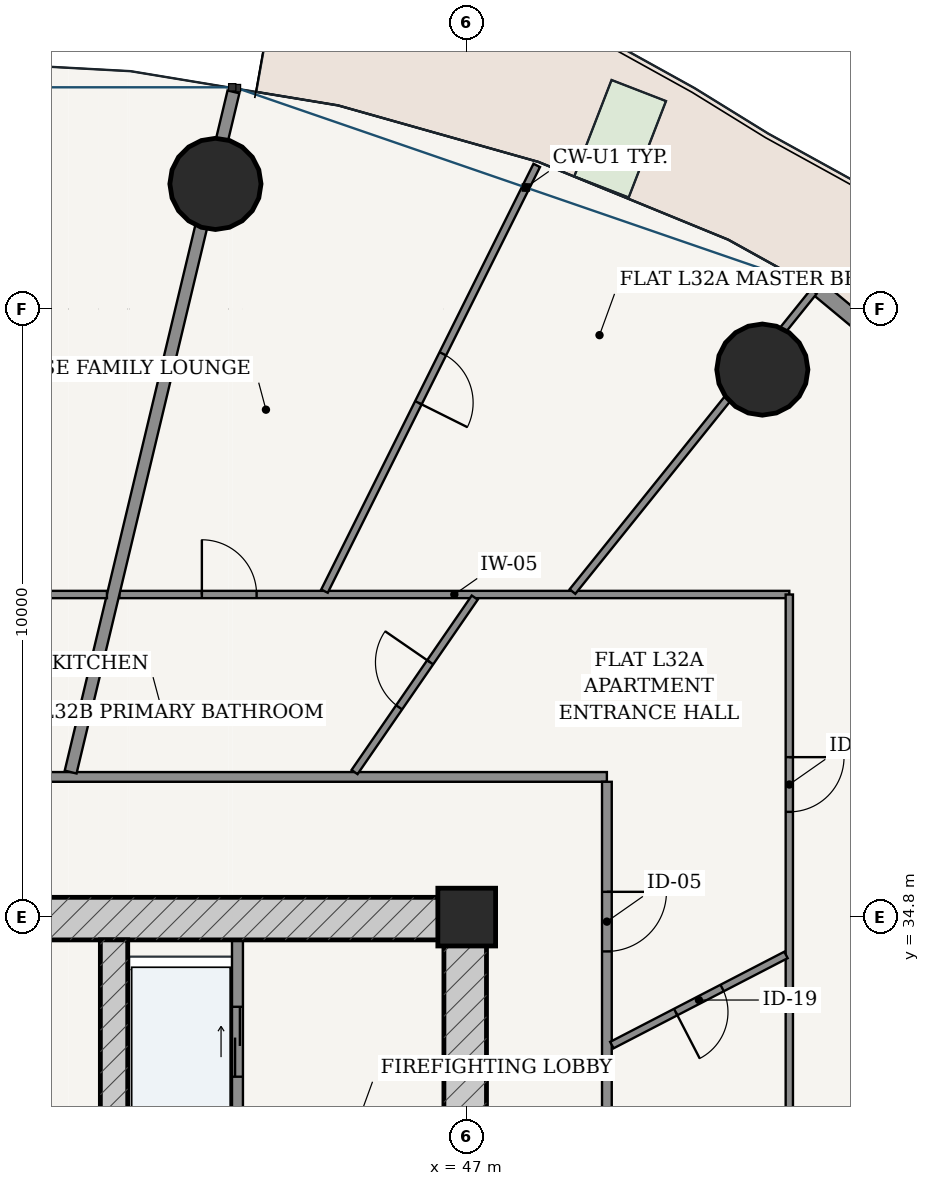
"""IFC4 building model, lengths in metres.
Left out: names, types, materials, properties, quantities, classifications, styles, units other than length and angle.
Written with IfcOpenShell. Run it as: python <this file> out.ifc"""

import sys

from ifc_helpers import new_model, si_unit, direction, frame, frame_2d, origin, origin_2d, place, context, subcontext, project, spatial, rectangle, hollow_circle, extrude, source, transform, mapped, element, fill, save


model = new_model("IFC4")
c1 = context("Model", 3, precision=1e-05, world=origin(), true_north=direction((-0.2419218956, 0.970295726276)))
c2 = subcontext(c1, "Body", "Model", "MODEL_VIEW")
j1 = project(units=[si_unit("LENGTHUNIT", "METRE"), si_unit("PLANEANGLEUNIT", "RADIAN")], contexts=[c1])
p1 = place(None, origin())
s1 = spatial("IfcSite", under=j1, at=p1, CompositionType="ELEMENT")
p2 = place(p1, origin())
s2 = spatial("IfcBuilding", under=s1, at=p2, CompositionType="ELEMENT")
p3 = place(p2, frame((0.0, 0.0, 123.0)))
s3 = spatial("IfcBuildingStorey", under=s2, at=p3, CompositionType="ELEMENT", Elevation=123.0)
p4 = place(p3, frame((47.0, 34.8, 0.0), z_axis=(0.0, 0.0, 1.0), x_axis=(1.0, 0.0, 0.0)))
e1 = element("IfcColumn", 1, at=p4, inside=s3, PredefinedType="COLUMN", context=c2, shape_type="SweptSolid", body=[
    extrude(rectangle(XDim=0.95, YDim=0.95, at=origin_2d()), origin(), (0.0, 0.0, 1.0), 3.6),
])
p5 = place(p3, frame((28.675, 34.775, 0.0), z_axis=(0.0, 0.0, 1.0), x_axis=(1.0, 0.0, 0.0)))
e2 = element("IfcWall", 2, at=p5, inside=s3, PredefinedType="SHEAR", context=c2, shape_type="SweptSolid", body=[
    extrude(rectangle(XDim=18.65, YDim=0.7, at=frame_2d((9.325, 0.0))), origin(), (0.0, 0.0, 1.0), 3.325),
])
p6 = place(p5, frame((8.9, 0.0, 0.0)))
e3 = element("IfcOpeningElement", 3, at=p6, cuts=e2, PredefinedType="OPENING", context=c2, shape_type="SweptSolid", body=[
    extrude(rectangle(XDim=0.85, YDim=2.1, at=frame_2d((0.425, 1.05))), frame((0.0, 0.36, 0.0), z_axis=(0.0, -1.0, 0.0), x_axis=(1.0, 0.0, 0.0)), (0.0, 0.0, 1.0), 0.72),
])
p7 = place(p3, frame((46.975, 19.175, 0.0), z_axis=(0.0, 0.0, 1.0), x_axis=(0.0, 1.0, 0.0)))
e4 = element("IfcWall", 4, at=p7, inside=s3, PredefinedType="SHEAR", context=c2, shape_type="SweptSolid", body=[
    extrude(rectangle(XDim=15.25, YDim=0.7, at=frame_2d((7.625, 0.0))), origin(), (0.0, 0.0, 1.0), 3.325),
])
p8 = place(p7, frame((9.875, 0.0, 0.0)))
e5 = element("IfcOpeningElement", 5, at=p8, cuts=e4, PredefinedType="OPENING", context=c2, shape_type="SweptSolid", body=[
    extrude(rectangle(XDim=1.5, YDim=2.2, at=frame_2d((0.75, 1.1))), frame((0.0, 0.36, 0.0), z_axis=(0.0, -1.0, 0.0), x_axis=(1.0, 0.0, 0.0)), (0.0, 0.0, 1.0), 0.72),
])
p9 = place(p3, frame((41.2, 19.175, 0.0), z_axis=(0.0, 0.0, 1.0), x_axis=(0.0, 1.0, 0.0)))
e6 = element("IfcWall", 6, at=p9, inside=s3, PredefinedType="SHEAR", context=c2, shape_type="SweptSolid", body=[
    extrude(rectangle(XDim=15.25, YDim=0.45, at=frame_2d((7.625, 0.0))), origin(), (0.0, 0.0, 1.0), 3.325),
])
p10 = place(p9, frame((7.8, 0.0, 0.0)))
e7 = element("IfcOpeningElement", 7, at=p10, cuts=e6, PredefinedType="OPENING", context=c2, shape_type="SweptSolid", body=[
    extrude(rectangle(XDim=1.05, YDim=2.15, at=frame_2d((0.525, 1.075))), frame((0.0, 0.235, 0.0), z_axis=(0.0, -1.0, 0.0), x_axis=(1.0, 0.0, 0.0)), (0.0, 0.0, 1.0), 0.47),
])
for number, where, z_axis, x_axis in (
    (8, (51.862, 43.803, 0.0), (0.0, 0.0, 1.0), (1.0, 0.0, 0.0)),
    (9, (42.867, 46.857, 0.0), (0.0, 0.0, 1.0), (1.0, 0.0, 0.0)),
):
    element("IfcColumn", number, at=place(p3, frame(where, z_axis=z_axis, x_axis=x_axis)), inside=s3, PredefinedType="COLUMN", context=c2, shape_type="SweptSolid", body=[
        extrude(hollow_circle(Radius=0.75, WallThickness=0.045, at=origin_2d()), origin(), (0.0, 0.0, 1.0), 3.6),
    ])
p11 = place(p3, frame((60.154, 39.01, 0.0), z_axis=(0.0, 0.0, 1.0), x_axis=(-0.769242574941, 0.638956853706, 0.0)))
e10 = element("IfcWall", 10, at=p11, inside=s3, PredefinedType="SOLIDWALL", context=c2, shape_type="SweptSolid", body=[
    extrude(rectangle(XDim=9.69, YDim=0.26, at=frame_2d((4.845, 0.0))), origin(), (0.0, 0.0, 1.0), 3.325),
])
p12 = place(p11, frame((4.17, 0.0, 0.0)))
e11 = element("IfcOpeningElement", 11, at=p12, cuts=e10, PredefinedType="OPENING", context=c2, shape_type="SweptSolid", body=[
    extrude(rectangle(XDim=1.35, YDim=2.2, at=frame_2d((0.675, 1.1))), frame((0.0, 0.14, 0.0), z_axis=(0.0, -1.0, 0.0), x_axis=(1.0, 0.0, 0.0)), (0.0, 0.0, 1.0), 0.28),
])
p13 = place(p3, frame((43.23, 28.52, 0.0), z_axis=(0.0, 0.0, 1.0), x_axis=(0.0, 1.0, 0.0)))
e12 = element("IfcWall", 12, at=p13, inside=s3, PredefinedType="PARTITIONING", context=c2, shape_type="SweptSolid", body=[
    extrude(rectangle(XDim=5.905, YDim=0.18, at=frame_2d((2.953, 0.0))), origin(), (0.0, 0.0, 1.0), 3.325),
])
p14 = place(p13, frame((0.905, 0.0, 0.0)))
e13 = element("IfcOpeningElement", 13, at=p14, cuts=e12, PredefinedType="OPENING", context=c2, shape_type="SweptSolid", body=[
    extrude(rectangle(XDim=0.85, YDim=2.1, at=frame_2d((0.425, 1.05))), frame((0.0, 0.1, 0.0), z_axis=(0.0, -1.0, 0.0), x_axis=(1.0, 0.0, 0.0)), (0.0, 0.0, 1.0), 0.2),
])
p15 = place(p13, frame((3.655, 0.0, 0.0)))
e14 = element("IfcOpeningElement", 14, at=p15, cuts=e12, PredefinedType="OPENING", context=c2, shape_type="SweptSolid", body=[
    extrude(rectangle(XDim=1.15, YDim=2.2, at=frame_2d((0.575, 1.1))), frame((0.0, 0.1, 0.0), z_axis=(0.0, -1.0, 0.0), x_axis=(1.0, 0.0, 0.0)), (0.0, 0.0, 1.0), 0.2),
])
p16 = place(p3, frame((26.695, 37.105, 0.0), z_axis=(0.0, 0.0, 1.0), x_axis=(1.0, 0.0, 0.0)))
e15 = element("IfcWall", 15, at=p16, inside=s3, PredefinedType="PARTITIONING", context=c2, shape_type="SweptSolid", body=[
    extrude(rectangle(XDim=22.61, YDim=0.16, at=frame_2d((11.305, 0.0))), origin(), (0.0, 0.0, 1.0), 2.767),
])
p17 = place(p16, frame((4.925, 0.0, 0.0)))
e16 = element("IfcOpeningElement", 16, at=p17, cuts=e15, PredefinedType="OPENING", context=c2, shape_type="SweptSolid", body=[
    extrude(rectangle(XDim=0.98, YDim=2.2, at=frame_2d((0.49, 1.1))), frame((0.0, 0.09, 0.0), z_axis=(0.0, -1.0, 0.0), x_axis=(1.0, 0.0, 0.0)), (0.0, 0.0, 1.0), 0.18),
])
p18 = place(p3, frame((49.305, 16.575, 0.0), z_axis=(0.0, 0.0, 1.0), x_axis=(0.0, 1.0, 0.0)))
e17 = element("IfcWall", 17, at=p18, inside=s3, PredefinedType="PARTITIONING", context=c2, shape_type="SweptSolid", body=[
    extrude(rectangle(XDim=20.45, YDim=0.16, at=frame_2d((10.225, 0.0))), origin(), (0.0, 0.0, 1.0), 2.767),
])
p19 = place(p18, frame((17.66, 0.0, 0.0)))
e18 = element("IfcOpeningElement", 18, at=p19, cuts=e17, PredefinedType="OPENING", context=c2, shape_type="SweptSolid", body=[
    extrude(rectangle(XDim=0.98, YDim=2.2, at=frame_2d((0.49, 1.1))), frame((0.0, 0.09, 0.0), z_axis=(0.0, -1.0, 0.0), x_axis=(1.0, 0.0, 0.0)), (0.0, 0.0, 1.0), 0.18),
])
p20 = place(p18, frame((1.374, 0.0, 0.0)))
e19 = element("IfcOpeningElement", 19, at=p20, cuts=e17, PredefinedType="OPENING", context=c2, shape_type="SweptSolid", body=[
    extrude(rectangle(XDim=0.98, YDim=2.2, at=frame_2d((0.49, 1.1))), frame((0.0, 0.09, 0.0), z_axis=(0.0, -1.0, 0.0), x_axis=(1.0, 0.0, 0.0)), (0.0, 0.0, 1.0), 0.18),
])
p21 = place(p3, frame((41.287, 40.105, 0.0), z_axis=(0.0, 0.0, 1.0), x_axis=(1.0, 0.0, 0.0)))
e20 = element("IfcWall", 20, at=p21, inside=s3, PredefinedType="PARTITIONING", context=c2, shape_type="SweptSolid", body=[
    extrude(rectangle(XDim=11.018, YDim=0.12, at=frame_2d((5.509, 0.0))), origin(), (0.0, 0.0, 1.0), 2.767),
])
p22 = place(p21, frame((1.357, 0.0, 0.0)))
e21 = element("IfcOpeningElement", 21, at=p22, cuts=e20, PredefinedType="OPENING", context=c2, shape_type="SweptSolid", body=[
    extrude(rectangle(XDim=0.9, YDim=2.15, at=frame_2d((0.45, 1.075))), frame((0.0, 0.07, 0.0), z_axis=(0.0, -1.0, 0.0), x_axis=(1.0, 0.0, 0.0)), (0.0, 0.0, 1.0), 0.14),
])
p23 = place(p3, frame((52.305, 40.105, 0.0), z_axis=(0.0, 0.0, 1.0), x_axis=(0.0, -1.0, 0.0)))
e22 = element("IfcWall", 22, at=p23, inside=s3, PredefinedType="PARTITIONING", context=c2, shape_type="SweptSolid", body=[
    extrude(rectangle(XDim=10.839, YDim=0.12, at=frame_2d((5.419, 0.0))), origin(), (0.0, 0.0, 1.0), 2.767),
])
p24 = place(p23, frame((2.675, 0.0, 0.0)))
e23 = element("IfcOpeningElement", 23, at=p24, cuts=e22, PredefinedType="OPENING", context=c2, shape_type="SweptSolid", body=[
    extrude(rectangle(XDim=0.9, YDim=2.15, at=frame_2d((0.45, 1.075))), frame((0.0, 0.07, 0.0), z_axis=(0.0, -1.0, 0.0), x_axis=(1.0, 0.0, 0.0)), (0.0, 0.0, 1.0), 0.14),
])
p25 = place(p3, frame((48.739, 40.153, 0.0), z_axis=(0.0, 0.0, 1.0), x_axis=(0.626714875168, 0.779248654309, 0.0)))
e24 = element("IfcWall", 24, at=p25, inside=s3, PredefinedType="PARTITIONING", context=c2, shape_type="SweptSolid", body=[
    extrude(rectangle(XDim=6.332, YDim=0.12, at=frame_2d((3.166, 0.0))), origin(), (0.0, 0.0, 1.0), 2.767),
])
p26 = place(p3, frame((44.661, 40.16, 0.0), z_axis=(0.0, 0.0, 1.0), x_axis=(0.446177198157, 0.894944639542, 0.0)))
e25 = element("IfcWall", 25, at=p26, inside=s3, PredefinedType="PARTITIONING", context=c2, shape_type="SweptSolid", body=[
    extrude(rectangle(XDim=7.823, YDim=0.12, at=frame_2d((3.912, 0.0))), origin(), (0.0, 0.0, 1.0), 2.767),
])
p27 = place(p26, frame((3.461, 0.0, 0.0)))
e26 = element("IfcOpeningElement", 26, at=p27, cuts=e25, PredefinedType="OPENING", context=c2, shape_type="SweptSolid", body=[
    extrude(rectangle(XDim=0.9, YDim=2.15, at=frame_2d((0.45, 1.075))), frame((0.0, 0.07, 0.0), z_axis=(0.0, -1.0, 0.0), x_axis=(1.0, 0.0, 0.0)), (0.0, 0.0, 1.0), 0.14),
])
p28 = place(p3, frame((49.387, 32.695, 0.0), z_axis=(0.0, 0.0, 1.0), x_axis=(0.888069491277, 0.459709232737, 0.0)))
e27 = element("IfcWall", 27, at=p28, inside=s3, PredefinedType="PARTITIONING", context=c2, shape_type="SweptSolid", body=[
    extrude(rectangle(XDim=3.224, YDim=0.12, at=frame_2d((1.612, 0.0))), origin(), (0.0, 0.0, 1.0), 3.325),
])
p29 = place(p28, frame((1.182, 0.0, 0.0)))
e28 = element("IfcOpeningElement", 28, at=p29, cuts=e27, PredefinedType="OPENING", context=c2, shape_type="SweptSolid", body=[
    extrude(rectangle(XDim=0.86, YDim=2.15, at=frame_2d((0.43, 1.075))), frame((0.0, 0.07, 0.0), z_axis=(0.0, -1.0, 0.0), x_axis=(1.0, 0.0, 0.0)), (0.0, 0.0, 1.0), 0.14),
])
p30 = place(p3, frame((45.155, 37.185, 0.0), z_axis=(0.0, 0.0, 1.0), x_axis=(0.567393940912, 0.82344648631, 0.0)))
e29 = element("IfcWall", 29, at=p30, inside=s3, PredefinedType="PARTITIONING", context=c2, shape_type="SweptSolid", body=[
    extrude(rectangle(XDim=3.484, YDim=0.12, at=frame_2d((1.742, 0.0))), origin(), (0.0, 0.0, 1.0), 3.004),
])
p31 = place(p30, frame((1.292, 0.0, 0.0)))
e30 = element("IfcOpeningElement", 30, at=p31, cuts=e29, PredefinedType="OPENING", context=c2, shape_type="SweptSolid", body=[
    extrude(rectangle(XDim=0.9, YDim=2.15, at=frame_2d((0.45, 1.075))), frame((0.0, 0.07, 0.0), z_axis=(0.0, -1.0, 0.0), x_axis=(1.0, 0.0, 0.0)), (0.0, 0.0, 1.0), 0.14),
])
p32 = place(p3, frame((40.486, 37.185, 0.0), z_axis=(0.0, 0.0, 1.0), x_axis=(0.232834224261, 0.972516438942, 0.0)))
e31 = element("IfcWall", 31, at=p32, inside=s3, PredefinedType="PARTITIONING", context=c2, shape_type="SweptSolid", body=[
    extrude(rectangle(XDim=11.502, YDim=0.2, at=frame_2d((5.751, 0.0))), origin(), (0.0, 0.0, 1.0), 2.767),
])
p33 = place(p3, frame((23.695, 40.105, 0.0), z_axis=(0.0, 0.0, 1.0), x_axis=(1.0, 0.0, 0.0)))
e32 = element("IfcWall", 32, at=p33, inside=s3, PredefinedType="PARTITIONING", context=c2, shape_type="SweptSolid", body=[
    extrude(rectangle(XDim=17.388, YDim=0.12, at=frame_2d((8.694, 0.0))), origin(), (0.0, 0.0, 1.0), 2.767),
])
p34 = place(p33, frame((7.184, 0.0, 0.0)))
e33 = element("IfcOpeningElement", 33, at=p34, cuts=e32, PredefinedType="OPENING", context=c2, shape_type="SweptSolid", body=[
    extrude(rectangle(XDim=0.9, YDim=2.15, at=frame_2d((0.45, 1.075))), frame((0.0, 0.07, 0.0), z_axis=(0.0, -1.0, 0.0), x_axis=(1.0, 0.0, 0.0)), (0.0, 0.0, 1.0), 0.14),
])
m1 = source(origin(), c2, "Body", "SweptSolid", [
    extrude(rectangle(XDim=1.15, YDim=2.2, at=frame_2d((0.575, 1.1))), frame((0.0, 0.025, 0.0), z_axis=(0.0, -1.0, 0.0), x_axis=(1.0, 0.0, 0.0)), (0.0, 0.0, 1.0), 0.05),
])
p35 = place(p15, origin())
e34 = element("IfcDoor", 34, at=p35, inside=s3, OperationType="DOUBLE_DOOR_SLIDING", PredefinedType="DOOR", context=c2, shape_type="MappedRepresentation", body=[
    mapped(m1, transform((0.0, 0.0, 0.0), scale=1.0)),
])
fill(e14, e34)
m2 = source(origin(), c2, "Body", "SweptSolid", [
    extrude(rectangle(XDim=0.98, YDim=2.2, at=frame_2d((0.49, 1.1))), frame((0.0, 0.025, 0.0), z_axis=(0.0, -1.0, 0.0), x_axis=(1.0, 0.0, 0.0)), (0.0, 0.0, 1.0), 0.05),
])
p36 = place(p19, frame((0.98, 0.0, 0.0), z_axis=(0.0, 0.0, 1.0), x_axis=(-1.0, 0.0, 0.0)))
e35 = element("IfcDoor", 35, at=p36, inside=s3, OperationType="SINGLE_SWING_LEFT", PredefinedType="DOOR", context=c2, shape_type="MappedRepresentation", body=[
    mapped(m2, transform((0.0, 0.0, 0.0), scale=1.0)),
])
fill(e18, e35)
m3 = source(origin(), c2, "Body", "SweptSolid", [
    extrude(rectangle(XDim=0.86, YDim=2.15, at=frame_2d((0.43, 1.075))), frame((0.0, 0.025, 0.0), z_axis=(0.0, -1.0, 0.0), x_axis=(1.0, 0.0, 0.0)), (0.0, 0.0, 1.0), 0.05),
])
p37 = place(p29, frame((0.86, 0.0, 0.0), z_axis=(0.0, 0.0, 1.0), x_axis=(-1.0, 0.0, 0.0)))
e36 = element("IfcDoor", 36, at=p37, inside=s3, OperationType="SINGLE_SWING_RIGHT", PredefinedType="DOOR", context=c2, shape_type="MappedRepresentation", body=[
    mapped(m3, transform((0.0, 0.0, 0.0), scale=1.0)),
])
fill(e28, e36)
m4 = source(origin(), c2, "Body", "SweptSolid", [
    extrude(rectangle(XDim=0.9, YDim=2.15, at=frame_2d((0.45, 1.075))), frame((0.0, 0.025, 0.0), z_axis=(0.0, -1.0, 0.0), x_axis=(1.0, 0.0, 0.0)), (0.0, 0.0, 1.0), 0.05),
])
p38 = place(p24, origin())
e37 = element("IfcDoor", 37, at=p38, inside=s3, OperationType="SINGLE_SWING_LEFT", PredefinedType="DOOR", context=c2, shape_type="MappedRepresentation", body=[
    mapped(m4, transform((0.0, 0.0, 0.0), scale=1.0)),
])
fill(e23, e37)
p39 = place(p31, origin())
e38 = element("IfcDoor", 38, at=p39, inside=s3, OperationType="SINGLE_SWING_RIGHT", PredefinedType="DOOR", context=c2, shape_type="MappedRepresentation", body=[
    mapped(m4, transform((0.0, 0.0, 0.0), scale=1.0)),
])
fill(e30, e38)
p40 = place(p22, origin())
e39 = element("IfcDoor", 39, at=p40, inside=s3, OperationType="SINGLE_SWING_LEFT", PredefinedType="DOOR", context=c2, shape_type="MappedRepresentation", body=[
    mapped(m4, transform((0.0, 0.0, 0.0), scale=1.0)),
])
fill(e21, e39)
p41 = place(p27, frame((0.9, 0.0, 0.0), z_axis=(0.0, 0.0, 1.0), x_axis=(-1.0, 0.0, 0.0)))
e40 = element("IfcDoor", 40, at=p41, inside=s3, OperationType="SINGLE_SWING_RIGHT", PredefinedType="DOOR", context=c2, shape_type="MappedRepresentation", body=[
    mapped(m4, transform((0.0, 0.0, 0.0), scale=1.0)),
])
fill(e26, e40)
save(model, sys.argv[1])
